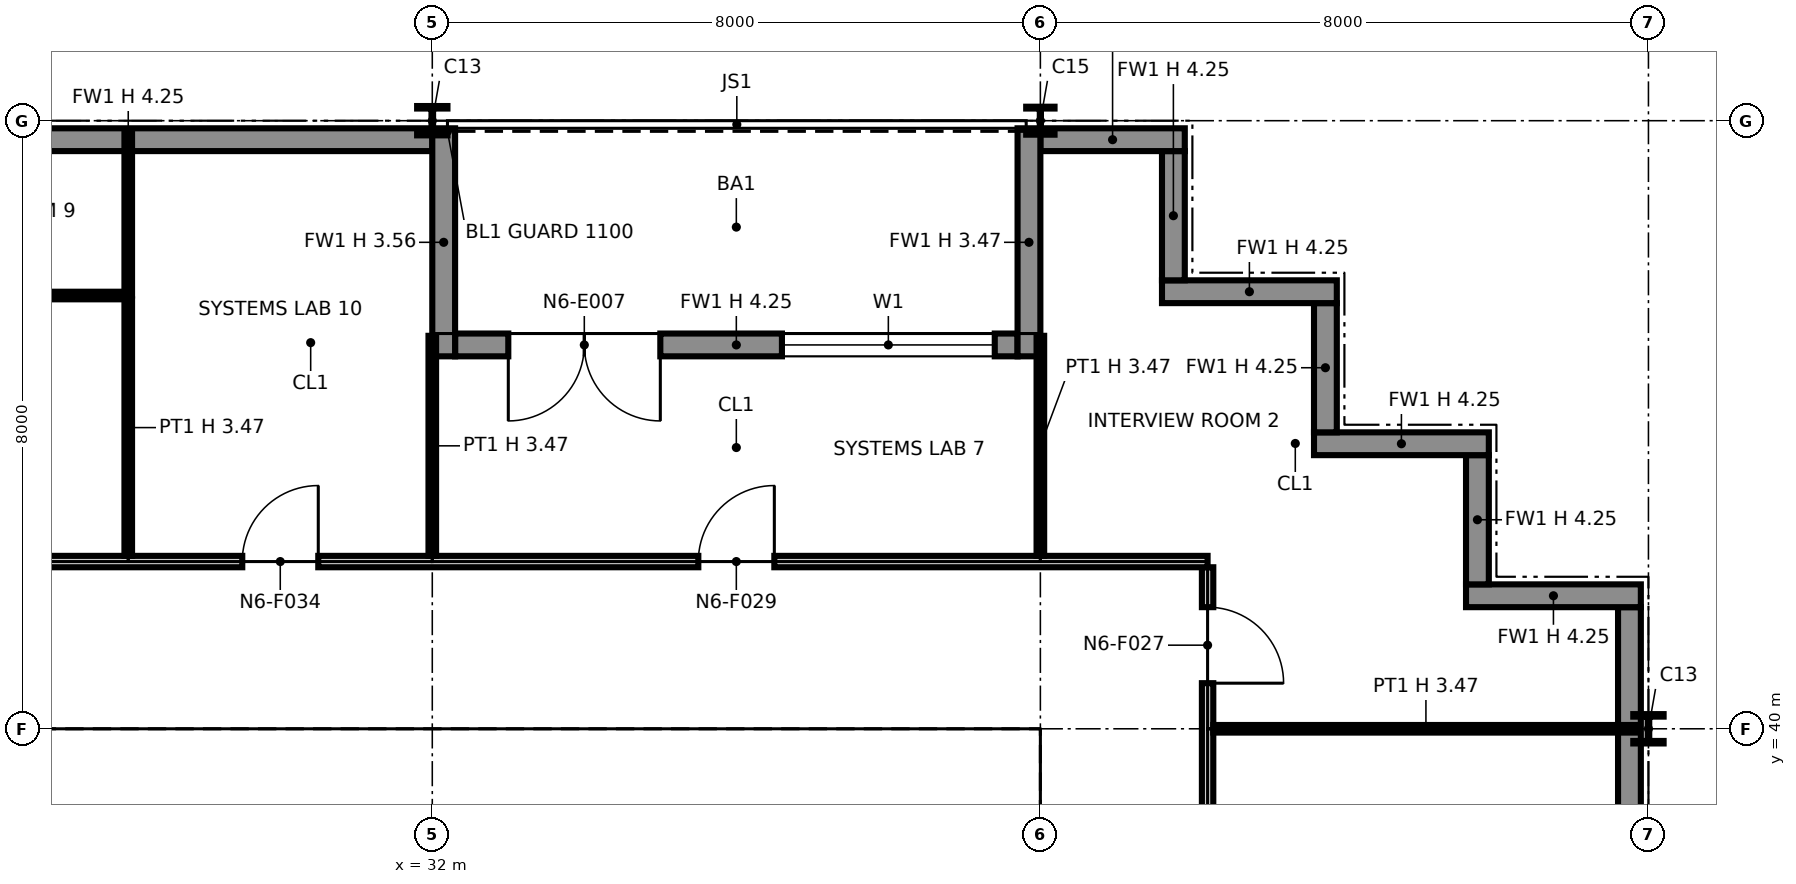
"""IFC4 building model, lengths in metres.
Left out: names, types, materials, properties, quantities, classifications, styles, units other than length and angle.
Written with IfcOpenShell. Run it as: python <this file> out.ifc"""

import sys

from ifc_helpers import new_model, si_unit, direction, frame, frame_2d, origin, origin_2d, place, context, subcontext, project, spatial, polyline, rectangle, i_section, outline, extrude, element, fill, save


model = new_model("IFC4")
c1 = context("Model", 3, precision=1e-05, world=origin(), true_north=direction((0.0, 1.0)))
c2 = subcontext(c1, "Body", "Model", "MODEL_VIEW")
j1 = project(units=[si_unit("LENGTHUNIT", "METRE"), si_unit("PLANEANGLEUNIT", "RADIAN")], contexts=[c1])
p1 = place(None, origin())
s1 = spatial("IfcSite", under=j1, at=p1, CompositionType="ELEMENT")
p2 = place(p1, origin())
s2 = spatial("IfcBuilding", under=s1, at=p2, CompositionType="ELEMENT")
p3 = place(p2, frame((0.0, 0.0, 96.4)))
s3 = spatial("IfcBuildingStorey", under=s2, at=p3, CompositionType="ELEMENT", Elevation=96.4)
p4 = place(p3, frame((32.0, 40.0, 0.0), z_axis=(0.0, 0.0, 1.0), x_axis=(1.0, 0.0, 0.0)))
e1 = element("IfcColumn", 1, at=p4, inside=s3, PredefinedType="COLUMN", context=c2, shape_type="SweptSolid", body=[
    extrude(i_section(OverallWidth=0.257, OverallDepth=0.363, WebThickness=0.013, FlangeThickness=0.022, at=origin_2d()), origin(), (0.0, 0.0, 1.0), 4.25),
])
p5 = place(p3, frame((32.0, 48.0, 0.0), z_axis=(0.0, 0.0, 1.0), x_axis=(1.0, 0.0, 0.0)))
e2 = element("IfcColumn", 2, at=p5, inside=s3, PredefinedType="COLUMN", context=c2, shape_type="SweptSolid", body=[
    extrude(i_section(OverallWidth=0.399, OverallDepth=0.386, WebThickness=0.021, FlangeThickness=0.033, at=origin_2d()), origin(), (0.0, 0.0, 1.0), 4.25),
])
p6 = place(p3, frame((40.0, 40.0, 0.0), z_axis=(0.0, 0.0, 1.0), x_axis=(1.0, 0.0, 0.0)))
e3 = element("IfcColumn", 3, at=p6, inside=s3, PredefinedType="COLUMN", context=c2, shape_type="SweptSolid", body=[
    extrude(i_section(OverallWidth=0.257, OverallDepth=0.363, WebThickness=0.013, FlangeThickness=0.022, at=origin_2d()), origin(), (0.0, 0.0, 1.0), 4.25),
])
p7 = place(p3, frame((40.0, 48.0, 0.0), z_axis=(0.0, 0.0, 1.0), x_axis=(1.0, 0.0, 0.0)))
e4 = element("IfcColumn", 4, at=p7, inside=s3, PredefinedType="COLUMN", context=c2, shape_type="SweptSolid", body=[
    extrude(i_section(OverallWidth=0.373, OverallDepth=0.368, WebThickness=0.015, FlangeThickness=0.024, at=origin_2d()), origin(), (0.0, 0.0, 1.0), 4.25),
])
p8 = place(p3, frame((48.0, 40.0, 0.0), z_axis=(0.0, 0.0, 1.0), x_axis=(1.0, 0.0, 0.0)))
e5 = element("IfcColumn", 5, at=p8, inside=s3, PredefinedType="COLUMN", context=c2, shape_type="SweptSolid", body=[
    extrude(i_section(OverallWidth=0.399, OverallDepth=0.386, WebThickness=0.021, FlangeThickness=0.033, at=origin_2d()), origin(), (0.0, 0.0, 1.0), 4.25),
])
p9 = place(p3, frame((47.75, 32.0, 0.0), z_axis=(0.0, 0.0, 1.0), x_axis=(0.0, 1.0, 0.0)))
e6 = element("IfcWall", 6, at=p9, inside=s3, PredefinedType="SOLIDWALL", context=c2, shape_type="SweptSolid", body=[
    extrude(rectangle(XDim=9.6, YDim=0.3, at=frame_2d((4.8, 0.0))), origin(), (0.0, 0.0, 1.0), 4.25),
])
p10 = place(p3, frame((47.9, 41.75, 0.0), z_axis=(0.0, 0.0, 1.0), x_axis=(-1.0, 0.0, 0.0)))
e7 = element("IfcWall", 7, at=p10, inside=s3, PredefinedType="SOLIDWALL", context=c2, shape_type="SweptSolid", body=[
    extrude(rectangle(XDim=2.3, YDim=0.3, at=frame_2d((1.15, 0.0))), origin(), (0.0, 0.0, 1.0), 4.25),
])
p11 = place(p3, frame((45.75, 41.9, 0.0), z_axis=(0.0, 0.0, 1.0), x_axis=(0.0, 1.0, 0.0)))
e8 = element("IfcWall", 8, at=p11, inside=s3, PredefinedType="SOLIDWALL", context=c2, shape_type="SweptSolid", body=[
    extrude(rectangle(XDim=1.7, YDim=0.3, at=frame_2d((0.85, 0.0))), origin(), (0.0, 0.0, 1.0), 4.25),
])
p12 = place(p3, frame((45.9, 43.75, 0.0), z_axis=(0.0, 0.0, 1.0), x_axis=(-1.0, 0.0, 0.0)))
e9 = element("IfcWall", 9, at=p12, inside=s3, PredefinedType="SOLIDWALL", context=c2, shape_type="SweptSolid", body=[
    extrude(rectangle(XDim=2.3, YDim=0.3, at=frame_2d((1.15, 0.0))), origin(), (0.0, 0.0, 1.0), 4.25),
])
p13 = place(p3, frame((43.75, 43.9, 0.0), z_axis=(0.0, 0.0, 1.0), x_axis=(0.0, 1.0, 0.0)))
e10 = element("IfcWall", 10, at=p13, inside=s3, PredefinedType="SOLIDWALL", context=c2, shape_type="SweptSolid", body=[
    extrude(rectangle(XDim=1.7, YDim=0.3, at=frame_2d((0.85, 0.0))), origin(), (0.0, 0.0, 1.0), 4.25),
])
p14 = place(p3, frame((43.9, 45.75, 0.0), z_axis=(0.0, 0.0, 1.0), x_axis=(-1.0, 0.0, 0.0)))
e11 = element("IfcWall", 11, at=p14, inside=s3, PredefinedType="SOLIDWALL", context=c2, shape_type="SweptSolid", body=[
    extrude(rectangle(XDim=2.3, YDim=0.3, at=frame_2d((1.15, 0.0))), origin(), (0.0, 0.0, 1.0), 4.25),
])
p15 = place(p3, frame((41.75, 45.9, 0.0), z_axis=(0.0, 0.0, 1.0), x_axis=(0.0, 1.0, 0.0)))
e12 = element("IfcWall", 12, at=p15, inside=s3, PredefinedType="SOLIDWALL", context=c2, shape_type="SweptSolid", body=[
    extrude(rectangle(XDim=1.7, YDim=0.3, at=frame_2d((0.85, 0.0))), origin(), (0.0, 0.0, 1.0), 4.25),
])
p16 = place(p3, frame((41.9, 47.75, 0.0), z_axis=(0.0, 0.0, 1.0), x_axis=(-1.0, 0.0, 0.0)))
e13 = element("IfcWall", 13, at=p16, inside=s3, PredefinedType="SOLIDWALL", context=c2, shape_type="SweptSolid", body=[
    extrude(rectangle(XDim=1.9, YDim=0.3, at=frame_2d((0.95, 0.0))), origin(), (0.0, 0.0, 1.0), 4.25),
])
p17 = place(p3, frame((39.7, 45.05, 0.0), z_axis=(0.0, 0.0, 1.0), x_axis=(-1.0, 0.0, 0.0)))
e14 = element("IfcWall", 14, at=p17, inside=s3, PredefinedType="SOLIDWALL", context=c2, shape_type="SweptSolid", body=[
    extrude(rectangle(XDim=7.4, YDim=0.3, at=frame_2d((3.7, 0.0))), origin(), (0.0, 0.0, 1.0), 4.25),
])
p18 = place(p17, frame((0.3, 0.0, 0.9)))
e15 = element("IfcOpeningElement", 15, at=p18, cuts=e14, PredefinedType="OPENING", context=c2, shape_type="SweptSolid", body=[
    extrude(rectangle(XDim=2.8, YDim=2.2, at=frame_2d((1.4, 1.1))), frame((0.0, 0.16, 0.0), z_axis=(0.0, -1.0, 0.0), x_axis=(1.0, 0.0, 0.0)), (0.0, 0.0, 1.0), 0.32),
])
p19 = place(p17, frame((4.7, 0.0, 0.0)))
e16 = element("IfcOpeningElement", 16, at=p19, cuts=e14, PredefinedType="OPENING", context=c2, shape_type="SweptSolid", body=[
    extrude(rectangle(XDim=2.0, YDim=2.4, at=frame_2d((1.0, 1.2))), frame((0.0, 0.16, 0.0), z_axis=(0.0, -1.0, 0.0), x_axis=(1.0, 0.0, 0.0)), (0.0, 0.0, 1.0), 0.32),
])
p20 = place(p3, frame((39.85, 47.9, 0.0), z_axis=(0.0, 0.0, 1.0), x_axis=(0.0, -1.0, 0.0)))
e17 = element("IfcWall", 17, at=p20, inside=s3, PredefinedType="SOLIDWALL", context=c2, shape_type="SweptSolid", body=[
    extrude(rectangle(XDim=3.0, YDim=0.3, at=frame_2d((1.5, 0.0))), origin(), (0.0, 0.0, 1.0), 3.469),
])
p21 = place(p3, frame((32.15, 47.9, 0.0), z_axis=(0.0, 0.0, 1.0), x_axis=(0.0, -1.0, 0.0)))
e18 = element("IfcWall", 18, at=p21, inside=s3, PredefinedType="SOLIDWALL", context=c2, shape_type="SweptSolid", body=[
    extrude(rectangle(XDim=3.0, YDim=0.3, at=frame_2d((1.5, 0.0))), origin(), (0.0, 0.0, 1.0), 3.556),
])
p22 = place(p3, frame((32.0, 47.75, 0.0), z_axis=(0.0, 0.0, 1.0), x_axis=(-1.0, 0.0, 0.0)))
e19 = element("IfcWall", 19, at=p22, inside=s3, PredefinedType="SOLIDWALL", context=c2, shape_type="SweptSolid", body=[
    extrude(rectangle(XDim=8.0, YDim=0.3, at=frame_2d((4.0, 0.0))), origin(), (0.0, 0.0, 1.0), 4.25),
])
p23 = place(p3, frame((24.65, 39.25, 0.0), z_axis=(0.0, 0.0, 1.0), x_axis=(1.0, 0.0, 0.0)))
e20 = element("IfcWall", 20, at=p23, inside=s3, PredefinedType="PARTITIONING", context=c2, shape_type="SweptSolid", body=[
    extrude(outline(polyline([(0.0, 0.0), (14.7, 0.0), (14.7, 4.25), (7.469, 4.25), (7.469, 3.632), (7.231, 3.632), (7.23, 4.25), (0.0, 4.25), (0.0, 0.0)])), frame((0.0, 0.1, 0.0), z_axis=(0.0, -1.0, 0.0), x_axis=(1.0, 0.0, 0.0)), (0.0, 0.0, 1.0), 0.2),
])
for number, where, z_axis, x_axis in (
    (21, (27.2, 36.4, 0.0), (0.0, 0.0, 1.0), (0.0, 1.0, 0.0)),
    (22, (29.5, 36.4, 0.0), (0.0, 0.0, 1.0), (0.0, 1.0, 0.0)),
):
    element("IfcWall", number, at=place(p3, frame(where, z_axis=z_axis, x_axis=x_axis)), inside=s3, PredefinedType="PARTITIONING", context=c2, shape_type="SweptSolid", body=[
        extrude(rectangle(XDim=2.75, YDim=0.2, at=frame_2d((1.375, 0.0))), origin(), (0.0, 0.0, 1.0), 4.25),
    ])
p24 = place(p3, frame((32.0, 32.85, 0.0), z_axis=(0.0, 0.0, 1.0), x_axis=(0.0, 1.0, 0.0)))
e23 = element("IfcWall", 23, at=p24, inside=s3, PredefinedType="PARTITIONING", context=c2, shape_type="SweptSolid", body=[
    extrude(rectangle(XDim=6.3, YDim=0.6, at=frame_2d((3.15, 0.0))), origin(), (0.0, 0.0, 1.0), 3.632),
])
for number, where, z_axis, x_axis in (
    (24, (35.6, 32.85, 0.0), (0.0, 0.0, 1.0), (0.0, 1.0, 0.0)),
    (25, (39.25, 32.85, 0.0), (0.0, 0.0, 1.0), (0.0, 1.0, 0.0)),
):
    element("IfcWall", number, at=place(p3, frame(where, z_axis=z_axis, x_axis=x_axis)), inside=s3, PredefinedType="PARTITIONING", context=c2, shape_type="SweptSolid", body=[
        extrude(rectangle(XDim=6.3, YDim=0.2, at=frame_2d((3.15, 0.0))), origin(), (0.0, 0.0, 1.0), 4.25),
    ])
p25 = place(p3, frame((42.2, 16.0, 0.0), z_axis=(0.0, 0.0, 1.0), x_axis=(0.0, 1.0, 0.0)))
e26 = element("IfcWall", 26, at=p25, inside=s3, PredefinedType="PARTITIONING", context=c2, shape_type="SweptSolid", body=[
    extrude(outline(polyline([(0.0, 0.0), (26.125, 0.0), (26.125, 4.25), (24.3, 4.25), (24.298, 3.47), (23.702, 3.47), (23.7, 4.25), (20.3, 4.25), (20.298, 3.47), (19.702, 3.47), (19.7, 4.25), (16.3, 4.25), (16.298, 3.47), (15.702, 3.47), (15.7, 4.25), (12.3, 4.25), (12.298, 3.47), (11.702, 3.47), (11.7, 4.25), (8.3, 4.25), (8.298, 3.47), (7.702, 3.47), (7.7, 4.25), (4.3, 4.25), (4.298, 3.47), (3.702, 3.47), (3.7, 4.25), (0.0, 4.25), (0.0, 0.0)])), frame((0.0, 0.075, 0.0), z_axis=(0.0, -1.0, 0.0), x_axis=(1.0, 0.0, 0.0)), (0.0, 0.0, 1.0), 0.15),
])
p26 = place(p25, frame((2.5, 0.0, 0.0), z_axis=(0.0, 0.0, 1.0), x_axis=(-1.0, 0.0, 0.0)))
e27 = element("IfcOpeningElement", 27, at=p26, cuts=e26, PredefinedType="OPENING", context=c2, shape_type="SweptSolid", body=[
    extrude(rectangle(XDim=1.0, YDim=2.1, at=frame_2d((0.5, 1.05))), frame((0.0, 0.085, 0.0), z_axis=(0.0, -1.0, 0.0), x_axis=(1.0, 0.0, 0.0)), (0.0, 0.0, 1.0), 0.17),
])
p27 = place(p25, frame((6.5, 0.0, 0.0), z_axis=(0.0, 0.0, 1.0), x_axis=(-1.0, 0.0, 0.0)))
e28 = element("IfcOpeningElement", 28, at=p27, cuts=e26, PredefinedType="OPENING", context=c2, shape_type="SweptSolid", body=[
    extrude(rectangle(XDim=1.0, YDim=2.1, at=frame_2d((0.5, 1.05))), frame((0.0, 0.085, 0.0), z_axis=(0.0, -1.0, 0.0), x_axis=(1.0, 0.0, 0.0)), (0.0, 0.0, 1.0), 0.17),
])
p28 = place(p25, frame((12.5, 0.0, 0.0), z_axis=(0.0, 0.0, 1.0), x_axis=(-1.0, 0.0, 0.0)))
e29 = element("IfcOpeningElement", 29, at=p28, cuts=e26, PredefinedType="OPENING", context=c2, shape_type="SweptSolid", body=[
    extrude(rectangle(XDim=1.0, YDim=2.1, at=frame_2d((0.5, 1.05))), frame((0.0, 0.085, 0.0), z_axis=(0.0, -1.0, 0.0), x_axis=(1.0, 0.0, 0.0)), (0.0, 0.0, 1.0), 0.17),
])
p29 = place(p25, frame((18.5, 0.0, 0.0), z_axis=(0.0, 0.0, 1.0), x_axis=(-1.0, 0.0, 0.0)))
e30 = element("IfcOpeningElement", 30, at=p29, cuts=e26, PredefinedType="OPENING", context=c2, shape_type="SweptSolid", body=[
    extrude(rectangle(XDim=1.0, YDim=2.1, at=frame_2d((0.5, 1.05))), frame((0.0, 0.085, 0.0), z_axis=(0.0, -1.0, 0.0), x_axis=(1.0, 0.0, 0.0)), (0.0, 0.0, 1.0), 0.17),
])
p30 = place(p25, frame((22.5, 0.0, 0.0), z_axis=(0.0, 0.0, 1.0), x_axis=(-1.0, 0.0, 0.0)))
e31 = element("IfcOpeningElement", 31, at=p30, cuts=e26, PredefinedType="OPENING", context=c2, shape_type="SweptSolid", body=[
    extrude(rectangle(XDim=1.0, YDim=2.1, at=frame_2d((0.5, 1.05))), frame((0.0, 0.085, 0.0), z_axis=(0.0, -1.0, 0.0), x_axis=(1.0, 0.0, 0.0)), (0.0, 0.0, 1.0), 0.17),
])
p31 = place(p25, frame((25.6, 0.0, 0.0), z_axis=(0.0, 0.0, 1.0), x_axis=(-1.0, 0.0, 0.0)))
e32 = element("IfcOpeningElement", 32, at=p31, cuts=e26, PredefinedType="OPENING", context=c2, shape_type="SweptSolid", body=[
    extrude(rectangle(XDim=1.0, YDim=2.1, at=frame_2d((0.5, 1.05))), frame((0.0, 0.085, 0.0), z_axis=(0.0, -1.0, 0.0), x_axis=(1.0, 0.0, 0.0)), (0.0, 0.0, 1.0), 0.17),
])
p32 = place(p3, frame((42.275, 40.0, 0.0), z_axis=(0.0, 0.0, 1.0), x_axis=(1.0, 0.0, 0.0)))
e33 = element("IfcWall", 33, at=p32, inside=s3, PredefinedType="PARTITIONING", context=c2, shape_type="SweptSolid", body=[
    extrude(rectangle(XDim=5.595, YDim=0.1, at=frame_2d((2.798, 0.0))), origin(), (0.0, 0.0, 1.0), 3.47),
])
p33 = place(p3, frame((8.05, 42.2, 0.0), z_axis=(0.0, 0.0, 1.0), x_axis=(1.0, 0.0, 0.0)))
e34 = element("IfcWall", 34, at=p33, inside=s3, PredefinedType="PARTITIONING", context=c2, shape_type="SweptSolid", body=[
    extrude(rectangle(XDim=34.15, YDim=0.15, at=frame_2d((17.075, 0.0))), origin(), (0.0, 0.0, 1.0), 4.25),
])
p34 = place(p33, frame((11.45, 0.0, 0.0)))
e35 = element("IfcOpeningElement", 35, at=p34, cuts=e34, PredefinedType="OPENING", context=c2, shape_type="SweptSolid", body=[
    extrude(rectangle(XDim=1.0, YDim=2.1, at=frame_2d((0.5, 1.05))), frame((0.0, 0.085, 0.0), z_axis=(0.0, -1.0, 0.0), x_axis=(1.0, 0.0, 0.0)), (0.0, 0.0, 1.0), 0.17),
])
p35 = place(p33, frame((27.45, 0.0, 0.0)))
e36 = element("IfcOpeningElement", 36, at=p35, cuts=e34, PredefinedType="OPENING", context=c2, shape_type="SweptSolid", body=[
    extrude(rectangle(XDim=1.0, YDim=2.1, at=frame_2d((0.5, 1.05))), frame((0.0, 0.085, 0.0), z_axis=(0.0, -1.0, 0.0), x_axis=(1.0, 0.0, 0.0)), (0.0, 0.0, 1.0), 0.17),
])
p36 = place(p33, frame((1.45, 0.0, 0.0)))
e37 = element("IfcOpeningElement", 37, at=p36, cuts=e34, PredefinedType="OPENING", context=c2, shape_type="SweptSolid", body=[
    extrude(rectangle(XDim=1.0, YDim=2.1, at=frame_2d((0.5, 1.05))), frame((0.0, 0.085, 0.0), z_axis=(0.0, -1.0, 0.0), x_axis=(1.0, 0.0, 0.0)), (0.0, 0.0, 1.0), 0.17),
])
p37 = place(p33, frame((5.45, 0.0, 0.0)))
e38 = element("IfcOpeningElement", 38, at=p37, cuts=e34, PredefinedType="OPENING", context=c2, shape_type="SweptSolid", body=[
    extrude(rectangle(XDim=1.0, YDim=2.1, at=frame_2d((0.5, 1.05))), frame((0.0, 0.085, 0.0), z_axis=(0.0, -1.0, 0.0), x_axis=(1.0, 0.0, 0.0)), (0.0, 0.0, 1.0), 0.17),
])
p38 = place(p33, frame((17.45, 0.0, 0.0)))
e39 = element("IfcOpeningElement", 39, at=p38, cuts=e34, PredefinedType="OPENING", context=c2, shape_type="SweptSolid", body=[
    extrude(rectangle(XDim=1.0, YDim=2.1, at=frame_2d((0.5, 1.05))), frame((0.0, 0.085, 0.0), z_axis=(0.0, -1.0, 0.0), x_axis=(1.0, 0.0, 0.0)), (0.0, 0.0, 1.0), 0.17),
])
p39 = place(p33, frame((21.45, 0.0, 0.0)))
e40 = element("IfcOpeningElement", 40, at=p39, cuts=e34, PredefinedType="OPENING", context=c2, shape_type="SweptSolid", body=[
    extrude(rectangle(XDim=1.0, YDim=2.1, at=frame_2d((0.5, 1.05))), frame((0.0, 0.085, 0.0), z_axis=(0.0, -1.0, 0.0), x_axis=(1.0, 0.0, 0.0)), (0.0, 0.0, 1.0), 0.17),
])
p40 = place(p3, frame((28.0, 42.275, 0.0), z_axis=(0.0, 0.0, 1.0), x_axis=(0.0, 1.0, 0.0)))
e41 = element("IfcWall", 41, at=p40, inside=s3, PredefinedType="PARTITIONING", context=c2, shape_type="SweptSolid", body=[
    extrude(rectangle(XDim=3.375, YDim=0.1, at=frame_2d((1.688, 0.0))), origin(), (0.0, 0.0, 1.0), 3.47),
])
for number, where, z_axis, x_axis in (
    (42, (32.0, 42.275, 0.0), (0.0, 0.0, 1.0), (0.0, 1.0, 0.0)),
    (43, (40.0, 42.275, 0.0), (0.0, 0.0, 1.0), (0.0, 1.0, 0.0)),
):
    element("IfcWall", number, at=place(p3, frame(where, z_axis=z_axis, x_axis=x_axis)), inside=s3, PredefinedType="PARTITIONING", context=c2, shape_type="SweptSolid", body=[
        extrude(rectangle(XDim=2.895, YDim=0.1, at=frame_2d((1.448, 0.0))), origin(), (0.0, 0.0, 1.0), 3.47),
    ])
p41 = place(p3, frame((24.03, 45.7, 0.0), z_axis=(0.0, 0.0, 1.0), x_axis=(1.0, 0.0, 0.0)))
e44 = element("IfcWall", 44, at=p41, inside=s3, PredefinedType="PARTITIONING", context=c2, shape_type="SweptSolid", body=[
    extrude(rectangle(XDim=3.92, YDim=0.1, at=frame_2d((1.96, 0.0))), origin(), (0.0, 0.0, 1.0), 4.25),
])
p42 = place(p41, frame((2.47, 0.0, 0.0), z_axis=(0.0, 0.0, 1.0), x_axis=(-1.0, 0.0, 0.0)))
e45 = element("IfcOpeningElement", 45, at=p42, cuts=e44, PredefinedType="OPENING", context=c2, shape_type="SweptSolid", body=[
    extrude(rectangle(XDim=1.0, YDim=2.1, at=frame_2d((0.5, 1.05))), frame((0.0, 0.06, 0.0), z_axis=(0.0, -1.0, 0.0), x_axis=(1.0, 0.0, 0.0)), (0.0, 0.0, 1.0), 0.12),
])
p43 = place(p3, frame((28.0, 45.7, 0.0), z_axis=(0.0, 0.0, 1.0), x_axis=(0.0, 1.0, 0.0)))
e46 = element("IfcWall", 46, at=p43, inside=s3, PredefinedType="PARTITIONING", context=c2, shape_type="SweptSolid", body=[
    extrude(rectangle(XDim=2.17, YDim=0.1, at=frame_2d((1.085, 0.0))), origin(), (0.0, 0.0, 1.0), 4.25),
])
p44 = place(p18, origin())
e47 = element("IfcWindow", 47, at=p44, inside=s3, PartitioningType="SINGLE_PANEL", PredefinedType="WINDOW", context=c2, shape_type="SweptSolid", body=[
    extrude(rectangle(XDim=2.8, YDim=2.2, at=frame_2d((1.4, 1.1))), frame((0.0, 0.03, 0.0), z_axis=(0.0, -1.0, 0.0), x_axis=(1.0, 0.0, 0.0)), (0.0, 0.0, 1.0), 0.06),
])
fill(e15, e47)
p45 = place(p19, origin())
e48 = element("IfcDoor", 48, at=p45, inside=s3, OperationType="DOUBLE_DOOR_SINGLE_SWING", PredefinedType="DOOR", context=c2, shape_type="SweptSolid", body=[
    extrude(rectangle(XDim=2.0, YDim=2.4, at=frame_2d((1.0, 1.2))), frame((0.0, 0.025, 0.0), z_axis=(0.0, -1.0, 0.0), x_axis=(1.0, 0.0, 0.0)), (0.0, 0.0, 1.0), 0.05),
])
fill(e16, e48)
p46 = place(p31, origin())
e49 = element("IfcDoor", 49, at=p46, inside=s3, OperationType="SINGLE_SWING_RIGHT", PredefinedType="DOOR", context=c2, shape_type="SweptSolid", body=[
    extrude(rectangle(XDim=1.0, YDim=2.1, at=frame_2d((0.5, 1.05))), frame((0.0, 0.025, 0.0), z_axis=(0.0, -1.0, 0.0), x_axis=(1.0, 0.0, 0.0)), (0.0, 0.0, 1.0), 0.05),
])
fill(e32, e49)
p47 = place(p35, origin())
e50 = element("IfcDoor", 50, at=p47, inside=s3, OperationType="SINGLE_SWING_RIGHT", PredefinedType="DOOR", context=c2, shape_type="SweptSolid", body=[
    extrude(rectangle(XDim=1.0, YDim=2.1, at=frame_2d((0.5, 1.05))), frame((0.0, 0.025, 0.0), z_axis=(0.0, -1.0, 0.0), x_axis=(1.0, 0.0, 0.0)), (0.0, 0.0, 1.0), 0.05),
])
fill(e36, e50)
p48 = place(p39, origin())
e51 = element("IfcDoor", 51, at=p48, inside=s3, OperationType="SINGLE_SWING_RIGHT", PredefinedType="DOOR", context=c2, shape_type="SweptSolid", body=[
    extrude(rectangle(XDim=1.0, YDim=2.1, at=frame_2d((0.5, 1.05))), frame((0.0, 0.025, 0.0), z_axis=(0.0, -1.0, 0.0), x_axis=(1.0, 0.0, 0.0)), (0.0, 0.0, 1.0), 0.05),
])
fill(e40, e51)
save(model, sys.argv[1])
